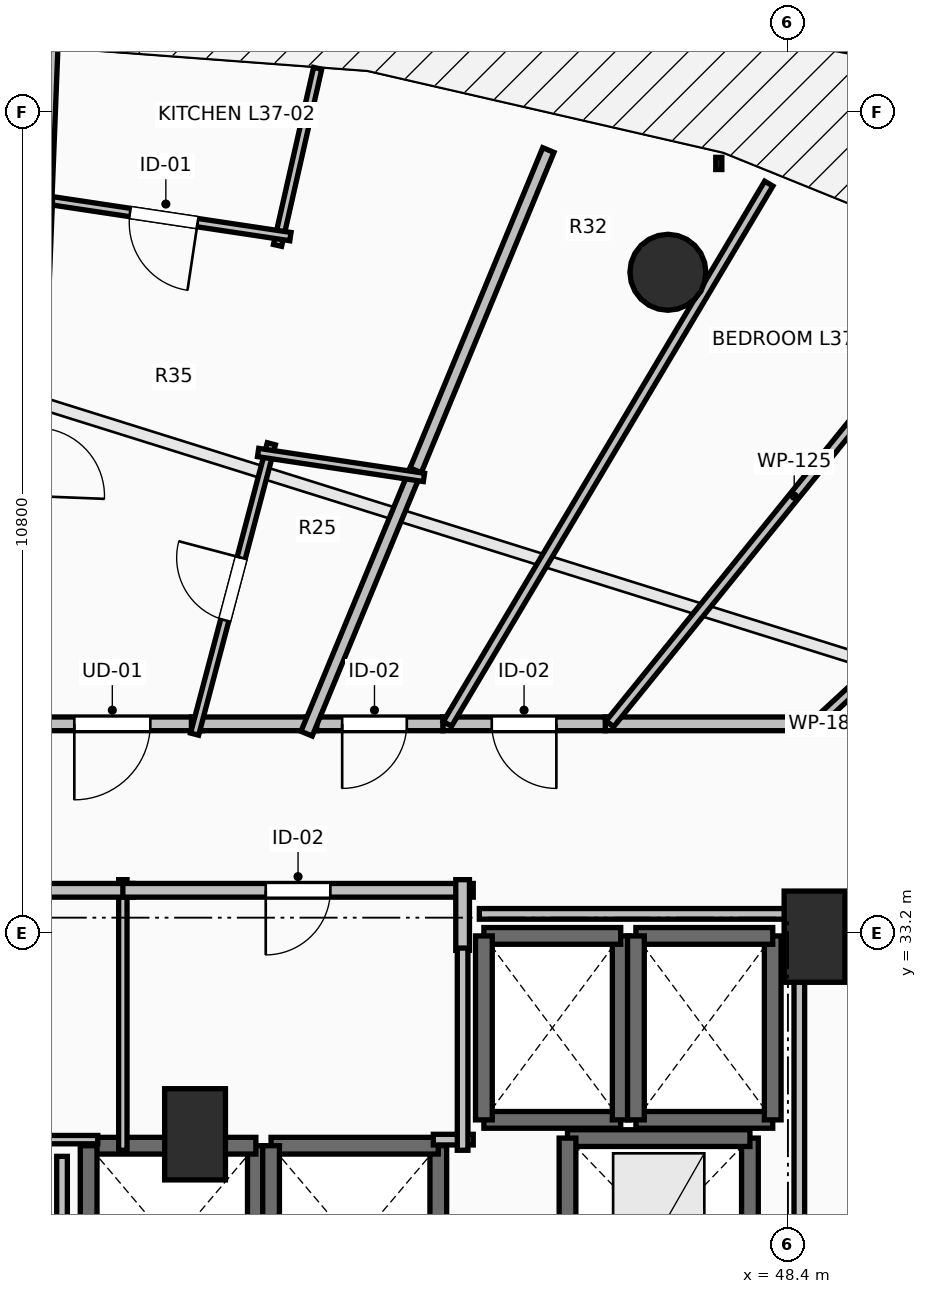
"""IFC4 building model, lengths in metres.
Left out: names, types, materials, properties, quantities, classifications, styles, units other than length and angle.
Written with IfcOpenShell. Run it as: python <this file> out.ifc"""

import sys

from ifc_helpers import new_model, si_unit, direction, frame, frame_2d, origin, origin_2d, place, context, subcontext, project, spatial, rectangle, circle, extrude, element, fill, save


model = new_model("IFC4")
c1 = context("Model", 3, precision=1e-05, world=origin(), true_north=direction((0.0, 1.0)))
c2 = subcontext(c1, "Body", "Model", "MODEL_VIEW")
j1 = project(units=[si_unit("LENGTHUNIT", "METRE"), si_unit("PLANEANGLEUNIT", "RADIAN")], contexts=[c1])
p1 = place(None, origin())
s1 = spatial("IfcSite", under=j1, at=p1, CompositionType="ELEMENT")
p2 = place(p1, origin())
s2 = spatial("IfcBuilding", under=s1, at=p2, CompositionType="ELEMENT")
p3 = place(p2, frame((0.0, 0.0, 139.6)))
s3 = spatial("IfcBuildingStorey", under=s2, at=p3, CompositionType="ELEMENT", Elevation=139.6)
p4 = place(p3, frame((46.821, 41.891, 0.0), z_axis=(0.0, 0.0, 1.0), x_axis=(0.382683432365, 0.923879532511, 0.0)))
e1 = element("IfcColumn", 1, at=p4, inside=s3, PredefinedType="COLUMN", context=c2, shape_type="SweptSolid", body=[
    extrude(circle(Radius=0.5, at=origin_2d()), origin(), (0.0, 0.0, 1.0), 3.5),
])
for number, where, z_axis, x_axis in (
    (2, (48.75, 33.15, 0.0), (0.0, 0.0, 1.0), (1.0, 0.0, 0.0)),
    (3, (40.6, 30.55, 0.0), (0.0, 0.0, 1.0), (1.0, 0.0, 0.0)),
):
    element("IfcColumn", number, at=place(p3, frame(where, z_axis=z_axis, x_axis=x_axis)), inside=s3, PredefinedType="PILASTER", context=c2, shape_type="SweptSolid", body=[
        extrude(rectangle(XDim=0.8, YDim=1.2, at=origin_2d()), origin(), (0.0, 0.0, 1.0), 3.5),
    ])
p5 = place(p3, frame((41.4, 27.8, 0.0), z_axis=(0.0, 0.0, 1.0), x_axis=(0.0, 1.0, 0.0)))
e4 = element("IfcWall", 4, at=p5, inside=s3, PredefinedType="SOLIDWALL", context=c2, shape_type="SweptSolid", body=[
    extrude(rectangle(XDim=2.6, YDim=0.22, at=frame_2d((1.3, 0.0))), origin(), (0.0, 0.0, 1.0), 3.24),
])
p6 = place(p3, frame((41.4, 30.4, 0.0), z_axis=(0.0, 0.0, 1.0), x_axis=(-1.0, 0.0, 0.0)))
e5 = element("IfcWall", 5, at=p6, inside=s3, PredefinedType="SOLIDWALL", context=c2, shape_type="SweptSolid", body=[
    extrude(rectangle(XDim=2.2, YDim=0.22, at=frame_2d((1.1, 0.0))), origin(), (0.0, 0.0, 1.0), 3.24),
])
for number, where, z_axis, x_axis in (
    (6, (39.2, 30.4, 0.0), (0.0, 0.0, 1.0), (0.0, -1.0, 0.0)),
    (7, (43.8, 27.8, 0.0), (0.0, 0.0, 1.0), (0.0, 1.0, 0.0)),
):
    element("IfcWall", number, at=place(p3, frame(where, z_axis=z_axis, x_axis=x_axis)), inside=s3, PredefinedType="SOLIDWALL", context=c2, shape_type="SweptSolid", body=[
        extrude(rectangle(XDim=2.6, YDim=0.22, at=frame_2d((1.3, 0.0))), origin(), (0.0, 0.0, 1.0), 3.24),
    ])
p7 = place(p3, frame((43.8, 30.4, 0.0), z_axis=(0.0, 0.0, 1.0), x_axis=(-1.0, 0.0, 0.0)))
e8 = element("IfcWall", 8, at=p7, inside=s3, PredefinedType="SOLIDWALL", context=c2, shape_type="SweptSolid", body=[
    extrude(rectangle(XDim=2.2, YDim=0.22, at=frame_2d((1.1, 0.0))), origin(), (0.0, 0.0, 1.0), 3.24),
])
p8 = place(p3, frame((41.6, 30.4, 0.0), z_axis=(0.0, 0.0, 1.0), x_axis=(0.0, -1.0, 0.0)))
e9 = element("IfcWall", 9, at=p8, inside=s3, PredefinedType="SOLIDWALL", context=c2, shape_type="SweptSolid", body=[
    extrude(rectangle(XDim=2.6, YDim=0.22, at=frame_2d((1.3, 0.0))), origin(), (0.0, 0.0, 1.0), 3.24),
])
p9 = place(p3, frame((44.4, 30.74, 0.0), z_axis=(0.0, 0.0, 1.0), x_axis=(1.0, 0.0, 0.0)))
e10 = element("IfcWall", 10, at=p9, inside=s3, PredefinedType="SOLIDWALL", context=c2, shape_type="SweptSolid", body=[
    extrude(rectangle(XDim=1.8, YDim=0.22, at=frame_2d((0.9, 0.0))), origin(), (0.0, 0.0, 1.0), 3.24),
])
p10 = place(p3, frame((46.2, 30.74, 0.0), z_axis=(0.0, 0.0, 1.0), x_axis=(0.0, 1.0, 0.0)))
e11 = element("IfcWall", 11, at=p10, inside=s3, PredefinedType="SOLIDWALL", context=c2, shape_type="SweptSolid", body=[
    extrude(rectangle(XDim=2.42, YDim=0.22, at=frame_2d((1.21, 0.0))), origin(), (0.0, 0.0, 1.0), 3.24),
])
p11 = place(p3, frame((46.2, 33.16, 0.0), z_axis=(0.0, 0.0, 1.0), x_axis=(-1.0, 0.0, 0.0)))
e12 = element("IfcWall", 12, at=p11, inside=s3, PredefinedType="SOLIDWALL", context=c2, shape_type="SweptSolid", body=[
    extrude(rectangle(XDim=1.8, YDim=0.22, at=frame_2d((0.9, 0.0))), origin(), (0.0, 0.0, 1.0), 3.24),
])
p12 = place(p3, frame((44.4, 33.16, 0.0), z_axis=(0.0, 0.0, 1.0), x_axis=(0.0, -1.0, 0.0)))
e13 = element("IfcWall", 13, at=p12, inside=s3, PredefinedType="SOLIDWALL", context=c2, shape_type="SweptSolid", body=[
    extrude(rectangle(XDim=2.42, YDim=0.22, at=frame_2d((1.21, 0.0))), origin(), (0.0, 0.0, 1.0), 3.24),
])
p13 = place(p3, frame((46.4, 30.74, 0.0), z_axis=(0.0, 0.0, 1.0), x_axis=(1.0, 0.0, 0.0)))
e14 = element("IfcWall", 14, at=p13, inside=s3, PredefinedType="SOLIDWALL", context=c2, shape_type="SweptSolid", body=[
    extrude(rectangle(XDim=1.8, YDim=0.22, at=frame_2d((0.9, 0.0))), origin(), (0.0, 0.0, 1.0), 3.24),
])
p14 = place(p3, frame((48.2, 30.74, 0.0), z_axis=(0.0, 0.0, 1.0), x_axis=(0.0, 1.0, 0.0)))
e15 = element("IfcWall", 15, at=p14, inside=s3, PredefinedType="SOLIDWALL", context=c2, shape_type="SweptSolid", body=[
    extrude(rectangle(XDim=2.42, YDim=0.22, at=frame_2d((1.21, 0.0))), origin(), (0.0, 0.0, 1.0), 3.24),
])
p15 = place(p3, frame((48.2, 33.16, 0.0), z_axis=(0.0, 0.0, 1.0), x_axis=(-1.0, 0.0, 0.0)))
e16 = element("IfcWall", 16, at=p15, inside=s3, PredefinedType="SOLIDWALL", context=c2, shape_type="SweptSolid", body=[
    extrude(rectangle(XDim=1.8, YDim=0.22, at=frame_2d((0.9, 0.0))), origin(), (0.0, 0.0, 1.0), 3.24),
])
p16 = place(p3, frame((46.4, 33.16, 0.0), z_axis=(0.0, 0.0, 1.0), x_axis=(0.0, -1.0, 0.0)))
e17 = element("IfcWall", 17, at=p16, inside=s3, PredefinedType="SOLIDWALL", context=c2, shape_type="SweptSolid", body=[
    extrude(rectangle(XDim=2.42, YDim=0.22, at=frame_2d((1.21, 0.0))), origin(), (0.0, 0.0, 1.0), 3.24),
])
p17 = place(p3, frame((47.9, 28.0, 0.0), z_axis=(0.0, 0.0, 1.0), x_axis=(0.0, 1.0, 0.0)))
e18 = element("IfcWall", 18, at=p17, inside=s3, PredefinedType="SHEAR", context=c2, shape_type="SweptSolid", body=[
    extrude(rectangle(XDim=2.5, YDim=0.22, at=frame_2d((1.25, 0.0))), origin(), (0.0, 0.0, 1.0), 3.24),
])
p18 = place(p3, frame((47.9, 30.5, 0.0), z_axis=(0.0, 0.0, 1.0), x_axis=(-1.0, 0.0, 0.0)))
e19 = element("IfcWall", 19, at=p18, inside=s3, PredefinedType="SHEAR", context=c2, shape_type="SweptSolid", body=[
    extrude(rectangle(XDim=2.4, YDim=0.22, at=frame_2d((1.2, 0.0))), origin(), (0.0, 0.0, 1.0), 3.24),
])
p19 = place(p3, frame((45.5, 30.5, 0.0), z_axis=(0.0, 0.0, 1.0), x_axis=(0.0, -1.0, 0.0)))
e20 = element("IfcWall", 20, at=p19, inside=s3, PredefinedType="SHEAR", context=c2, shape_type="SweptSolid", body=[
    extrude(rectangle(XDim=2.5, YDim=0.22, at=frame_2d((1.25, 0.0))), origin(), (0.0, 0.0, 1.0), 3.24),
])
p20 = place(p3, frame((39.65, 30.34, 0.0), z_axis=(0.0, 0.0, 1.0), x_axis=(0.0, 1.0, 0.0)))
e21 = element("IfcWall", 21, at=p20, inside=s3, PredefinedType="PARTITIONING", context=c2, shape_type="SweptSolid", body=[
    extrude(rectangle(XDim=3.56, YDim=0.11, at=frame_2d((1.78, 0.0))), origin(), (0.0, 0.0, 1.0), 2.432),
])
p21 = place(p3, frame((36.16, 30.48, 0.0), z_axis=(0.0, 0.0, 1.0), x_axis=(1.0, 0.0, 0.0)))
e22 = element("IfcWall", 22, at=p21, inside=s3, PredefinedType="PARTITIONING", context=c2, shape_type="SweptSolid", body=[
    extrude(rectangle(XDim=3.16, YDim=0.11, at=frame_2d((1.58, 0.0))), origin(), (0.0, 0.0, 1.0), 2.432),
])
p22 = place(p3, frame((39.79, 33.76, 0.0), z_axis=(0.0, 0.0, 1.0), x_axis=(-1.0, 0.0, 0.0)))
e23 = element("IfcWall", 23, at=p22, inside=s3, PredefinedType="PARTITIONING", context=c2, shape_type="SweptSolid", body=[
    extrude(rectangle(XDim=3.63, YDim=0.18, at=frame_2d((1.815, 0.0))), origin(), (0.0, 0.0, 1.0), 3.24),
])
p23 = place(p22, frame((1.39, 0.0, 0.0)))
e24 = element("IfcOpeningElement", 24, at=p23, cuts=e23, PredefinedType="OPENING", context=c2, shape_type="SweptSolid", body=[
    extrude(rectangle(XDim=0.85, YDim=2.1, at=frame_2d((0.425, 1.05))), frame((0.0, 0.105, 0.0), z_axis=(0.0, -1.0, 0.0), x_axis=(1.0, 0.0, 0.0)), (0.0, 0.0, 1.0), 0.21),
])
p24 = place(p3, frame((44.26, 33.76, 0.0), z_axis=(0.0, 0.0, 1.0), x_axis=(-1.0, 0.0, 0.0)))
e25 = element("IfcWall", 25, at=p24, inside=s3, PredefinedType="PARTITIONING", context=c2, shape_type="SweptSolid", body=[
    extrude(rectangle(XDim=4.61, YDim=0.18, at=frame_2d((2.305, 0.0))), origin(), (0.0, 0.0, 1.0), 3.24),
])
p25 = place(p24, frame((1.88, 0.0, 0.0)))
e26 = element("IfcOpeningElement", 26, at=p25, cuts=e25, PredefinedType="OPENING", context=c2, shape_type="SweptSolid", body=[
    extrude(rectangle(XDim=0.85, YDim=2.1, at=frame_2d((0.425, 1.05))), frame((0.0, 0.105, 0.0), z_axis=(0.0, -1.0, 0.0), x_axis=(1.0, 0.0, 0.0)), (0.0, 0.0, 1.0), 0.21),
])
p26 = place(p3, frame((44.12, 32.97, 0.0), z_axis=(0.0, 0.0, 1.0), x_axis=(0.0, 1.0, 0.0)))
e27 = element("IfcWall", 27, at=p26, inside=s3, PredefinedType="PARTITIONING", context=c2, shape_type="SweptSolid", body=[
    extrude(rectangle(XDim=0.93, YDim=0.18, at=frame_2d((0.465, 0.0))), origin(), (0.0, 0.0, 1.0), 3.24),
])
p27 = place(p3, frame((50.8, 35.95, 0.0), z_axis=(0.0, 0.0, 1.0), x_axis=(-1.0, 0.0, 0.0)))
e28 = element("IfcWall", 28, at=p27, inside=s3, PredefinedType="PARTITIONING", context=c2, shape_type="SweptSolid", body=[
    extrude(rectangle(XDim=2.096, YDim=0.18, at=frame_2d((1.048, 0.0))), origin(), (0.0, 0.0, 1.0), 2.972),
])
p28 = place(p3, frame((48.704, 35.95, 0.0), z_axis=(0.0, 0.0, 1.0), x_axis=(-1.0, 0.0, 0.0)))
e29 = element("IfcWall", 29, at=p28, inside=s3, PredefinedType="PARTITIONING", context=c2, shape_type="SweptSolid", body=[
    extrude(rectangle(XDim=2.707, YDim=0.18, at=frame_2d((1.354, 0.0))), origin(), (0.0, 0.0, 1.0), 2.432),
])
p29 = place(p3, frame((45.997, 35.95, 0.0), z_axis=(0.0, 0.0, 1.0), x_axis=(-1.0, 0.0, 0.0)))
e30 = element("IfcWall", 30, at=p29, inside=s3, PredefinedType="PARTITIONING", context=c2, shape_type="SweptSolid", body=[
    extrude(rectangle(XDim=2.137, YDim=0.18, at=frame_2d((1.068, 0.0))), origin(), (0.0, 0.0, 1.0), 2.972),
])
p30 = place(p29, frame((0.644, 0.0, 0.0)))
e31 = element("IfcOpeningElement", 31, at=p30, cuts=e30, PredefinedType="OPENING", context=c2, shape_type="SweptSolid", body=[
    extrude(rectangle(XDim=0.85, YDim=2.1, at=frame_2d((0.425, 1.05))), frame((0.0, 0.105, 0.0), z_axis=(0.0, -1.0, 0.0), x_axis=(1.0, 0.0, 0.0)), (0.0, 0.0, 1.0), 0.21),
])
p31 = place(p3, frame((43.86, 35.95, 0.0), z_axis=(0.0, 0.0, 1.0), x_axis=(-1.0, 0.0, 0.0)))
e32 = element("IfcWall", 32, at=p31, inside=s3, PredefinedType="PARTITIONING", context=c2, shape_type="SweptSolid", body=[
    extrude(rectangle(XDim=1.799, YDim=0.18, at=frame_2d((0.899, 0.0))), origin(), (0.0, 0.0, 1.0), 3.24),
])
p32 = place(p31, frame((0.475, 0.0, 0.0)))
e33 = element("IfcOpeningElement", 33, at=p32, cuts=e32, PredefinedType="OPENING", context=c2, shape_type="SweptSolid", body=[
    extrude(rectangle(XDim=0.85, YDim=2.1, at=frame_2d((0.425, 1.05))), frame((0.0, 0.105, 0.0), z_axis=(0.0, -1.0, 0.0), x_axis=(1.0, 0.0, 0.0)), (0.0, 0.0, 1.0), 0.21),
])
p33 = place(p3, frame((40.692, 35.95, 0.0), z_axis=(0.0, 0.0, 1.0), x_axis=(-1.0, 0.0, 0.0)))
e34 = element("IfcWall", 34, at=p33, inside=s3, PredefinedType="PARTITIONING", context=c2, shape_type="SweptSolid", body=[
    extrude(rectangle(XDim=2.361, YDim=0.18, at=frame_2d((1.18, 0.0))), origin(), (0.0, 0.0, 1.0), 3.24),
])
p34 = place(p33, frame((0.68, 0.0, 0.0)))
e35 = element("IfcOpeningElement", 35, at=p34, cuts=e34, PredefinedType="OPENING", context=c2, shape_type="SweptSolid", body=[
    extrude(rectangle(XDim=1.0, YDim=2.15, at=frame_2d((0.5, 1.075))), frame((0.0, 0.105, 0.0), z_axis=(0.0, -1.0, 0.0), x_axis=(1.0, 0.0, 0.0)), (0.0, 0.0, 1.0), 0.21),
])
p35 = place(p3, frame((42.201, 35.95, 0.0), z_axis=(0.0, 0.0, 1.0), x_axis=(-1.0, 0.0, 0.0)))
e36 = element("IfcWall", 36, at=p35, inside=s3, PredefinedType="PARTITIONING", context=c2, shape_type="SweptSolid", body=[
    extrude(rectangle(XDim=1.649, YDim=0.18, at=frame_2d((0.824, 0.0))), origin(), (0.0, 0.0, 1.0), 3.24),
])
p36 = place(p3, frame((51.874, 38.824, 0.0), z_axis=(0.0, 0.0, 1.0), x_axis=(-0.734347971597, -0.678773199685, 0.0)))
e37 = element("IfcWall", 37, at=p36, inside=s3, PredefinedType="PARTITIONING", context=c2, shape_type="SweptSolid", body=[
    extrude(rectangle(XDim=4.235, YDim=0.125, at=frame_2d((2.117, 0.0))), origin(), (0.0, 0.0, 1.0), 2.922),
])
p37 = place(p36, frame((1.667, 0.0, 0.0)))
e38 = element("IfcOpeningElement", 38, at=p37, cuts=e37, PredefinedType="OPENING", context=c2, shape_type="SweptSolid", body=[
    extrude(rectangle(XDim=0.9, YDim=2.1, at=frame_2d((0.45, 1.05))), frame((0.0, 0.077, 0.0), z_axis=(0.0, -1.0, 0.0), x_axis=(1.0, 0.0, 0.0)), (0.0, 0.0, 1.0), 0.155),
])
p38 = place(p3, frame((50.908, 41.94, 0.0), z_axis=(0.0, 0.0, 1.0), x_axis=(-0.62935766896, -0.77711577292, 0.0)))
e39 = element("IfcWall", 39, at=p38, inside=s3, PredefinedType="PARTITIONING", context=c2, shape_type="SweptSolid", body=[
    extrude(rectangle(XDim=7.708, YDim=0.125, at=frame_2d((3.854, 0.0))), origin(), (0.0, 0.0, 1.0), 2.432),
])
p39 = place(p3, frame((48.148, 43.057, 0.0), z_axis=(0.0, 0.0, 1.0), x_axis=(-0.511279346901, -0.859414585304, 0.0)))
e40 = element("IfcWall", 40, at=p39, inside=s3, PredefinedType="PARTITIONING", context=c2, shape_type="SweptSolid", body=[
    extrude(rectangle(XDim=8.27, YDim=0.125, at=frame_2d((4.135, 0.0))), origin(), (0.0, 0.0, 1.0), 2.432),
])
p40 = place(p3, frame((45.248, 43.499, 0.0), z_axis=(0.0, 0.0, 1.0), x_axis=(-0.382708032219, -0.923869342535, 0.0)))
e41 = element("IfcWall", 41, at=p40, inside=s3, PredefinedType="PARTITIONING", context=c2, shape_type="SweptSolid", body=[
    extrude(rectangle(XDim=4.701, YDim=0.16, at=frame_2d((2.351, 0.0))), origin(), (0.0, 0.0, 1.0), 2.728),
])
p41 = place(p3, frame((43.503, 39.285, 0.0), z_axis=(0.0, 0.0, 1.0), x_axis=(-0.382733183699, -0.923858923265, 0.0)))
e42 = element("IfcWall", 42, at=p41, inside=s3, PredefinedType="PARTITIONING", context=c2, shape_type="SweptSolid", body=[
    extrude(rectangle(XDim=3.75, YDim=0.16, at=frame_2d((1.875, 0.0))), origin(), (0.0, 0.0, 1.0), 2.922),
])
p42 = place(p3, frame((40.594, 35.815, 0.0), z_axis=(0.0, 0.0, 1.0), x_axis=(0.255512094359, 0.966805859331, 0.0)))
e43 = element("IfcWall", 43, at=p42, inside=s3, PredefinedType="PARTITIONING", context=c2, shape_type="SweptSolid", body=[
    extrude(rectangle(XDim=3.951, YDim=0.11, at=frame_2d((1.976, 0.0))), origin(), (0.0, 0.0, 1.0), 2.922),
])
p43 = place(p42, frame((1.551, 0.0, 0.0)))
e44 = element("IfcOpeningElement", 44, at=p43, cuts=e43, PredefinedType="OPENING", context=c2, shape_type="SweptSolid", body=[
    extrude(rectangle(XDim=0.85, YDim=2.1, at=frame_2d((0.425, 1.05))), frame((0.0, 0.07, 0.0), z_axis=(0.0, -1.0, 0.0), x_axis=(1.0, 0.0, 0.0)), (0.0, 0.0, 1.0), 0.14),
])
p44 = place(p3, frame((41.43, 39.52, 0.0), z_axis=(0.0, 0.0, 1.0), x_axis=(0.98891036234, -0.148513619769, 0.0)))
e45 = element("IfcWall", 45, at=p44, inside=s3, PredefinedType="PARTITIONING", context=c2, shape_type="SweptSolid", body=[
    extrude(rectangle(XDim=2.206, YDim=0.11, at=frame_2d((1.103, 0.0))), origin(), (0.0, 0.0, 1.0), 2.922),
])
p45 = place(p3, frame((42.213, 44.574, 0.0), z_axis=(0.0, 0.0, 1.0), x_axis=(-0.220932027223, -0.975289208054, 0.0)))
e46 = element("IfcWall", 46, at=p45, inside=s3, PredefinedType="PARTITIONING", context=c2, shape_type="SweptSolid", body=[
    extrude(rectangle(XDim=2.389, YDim=0.11, at=frame_2d((1.195, 0.0))), origin(), (0.0, 0.0, 1.0), 2.728),
])
p46 = place(p3, frame((41.854, 42.36, 0.0), z_axis=(0.0, 0.0, 1.0), x_axis=(-0.988887919082, 0.148662986296, 0.0)))
e47 = element("IfcWall", 47, at=p46, inside=s3, PredefinedType="PARTITIONING", context=c2, shape_type="SweptSolid", body=[
    extrude(rectangle(XDim=3.368, YDim=0.11, at=frame_2d((1.684, 0.0))), origin(), (0.0, 0.0, 1.0), 3.24),
])
p47 = place(p46, frame((1.234, 0.0, 0.0)))
e48 = element("IfcOpeningElement", 48, at=p47, cuts=e47, PredefinedType="OPENING", context=c2, shape_type="SweptSolid", body=[
    extrude(rectangle(XDim=0.9, YDim=2.1, at=frame_2d((0.45, 1.05))), frame((0.0, 0.07, 0.0), z_axis=(0.0, -1.0, 0.0), x_axis=(1.0, 0.0, 0.0)), (0.0, 0.0, 1.0), 0.14),
])
p48 = place(p3, frame((38.662, 42.84, 0.0), z_axis=(0.0, 0.0, 1.0), x_axis=(-0.039300632457, -0.999227431713, 0.0)))
e49 = element("IfcWall", 49, at=p48, inside=s3, PredefinedType="PARTITIONING", context=c2, shape_type="SweptSolid", body=[
    extrude(rectangle(XDim=6.896, YDim=0.125, at=frame_2d((3.448, 0.0))), origin(), (0.0, 0.0, 1.0), 2.922),
])
p49 = place(p48, frame((2.998, 0.0, 0.0)))
e50 = element("IfcOpeningElement", 50, at=p49, cuts=e49, PredefinedType="OPENING", context=c2, shape_type="SweptSolid", body=[
    extrude(rectangle(XDim=0.9, YDim=2.1, at=frame_2d((0.45, 1.05))), frame((0.0, 0.077, 0.0), z_axis=(0.0, -1.0, 0.0), x_axis=(1.0, 0.0, 0.0)), (0.0, 0.0, 1.0), 0.155),
])
p50 = place(p3, frame((38.74, 44.835, 0.0), z_axis=(0.0, 0.0, 1.0), x_axis=(-0.039310852952, -0.999227029679, 0.0)))
e51 = element("IfcWall", 51, at=p50, inside=s3, PredefinedType="PARTITIONING", context=c2, shape_type="SweptSolid", body=[
    extrude(rectangle(XDim=2.136, YDim=0.11, at=frame_2d((1.068, 0.0))), origin(), (0.0, 0.0, 1.0), 2.728),
])
p51 = place(p3, frame((43.735, 30.48, 0.0), z_axis=(0.0, 0.0, 1.0), x_axis=(1.0, 0.0, 0.0)))
e52 = element("IfcWall", 52, at=p51, inside=s3, PredefinedType="PARTITIONING", context=c2, shape_type="SweptSolid", body=[
    extrude(rectangle(XDim=0.525, YDim=0.14, at=frame_2d((0.262, 0.0))), origin(), (0.0, 0.0, 1.0), 3.24),
])
p52 = place(p3, frame((44.12, 30.34, 0.0), z_axis=(0.0, 0.0, 1.0), x_axis=(0.0, 1.0, 0.0)))
e53 = element("IfcWall", 53, at=p52, inside=s3, PredefinedType="PARTITIONING", context=c2, shape_type="SweptSolid", body=[
    extrude(rectangle(XDim=2.66, YDim=0.14, at=frame_2d((1.33, 0.0))), origin(), (0.0, 0.0, 1.0), 3.24),
])
p53 = place(p3, frame((38.85, 27.87, 0.0), z_axis=(0.0, 0.0, 1.0), x_axis=(0.0, 1.0, 0.0)))
e54 = element("IfcWall", 54, at=p53, inside=s3, PredefinedType="PARTITIONING", context=c2, shape_type="SweptSolid", body=[
    extrude(rectangle(XDim=2.39, YDim=0.14, at=frame_2d((1.195, 0.0))), origin(), (0.0, 0.0, 1.0), 3.24),
])
p54 = place(p3, frame((48.55, 28.196, 0.0), z_axis=(0.0, 0.0, 1.0), x_axis=(0.0, 1.0, 0.0)))
e55 = element("IfcWall", 55, at=p54, inside=s3, PredefinedType="PARTITIONING", context=c2, shape_type="SweptSolid", body=[
    extrude(rectangle(XDim=5.254, YDim=0.14, at=frame_2d((2.627, 0.0))), origin(), (0.0, 0.0, 1.0), 2.432),
])
p55 = place(p3, frame((48.55, 33.45, 0.0), z_axis=(0.0, 0.0, 1.0), x_axis=(-1.0, 0.0, 0.0)))
e56 = element("IfcWall", 56, at=p55, inside=s3, PredefinedType="PARTITIONING", context=c2, shape_type="SweptSolid", body=[
    extrude(rectangle(XDim=4.21, YDim=0.14, at=frame_2d((2.105, 0.0))), origin(), (0.0, 0.0, 1.0), 2.432),
])
p56 = place(p25, origin())
e57 = element("IfcDoor", 57, at=p56, inside=s3, OperationType="SINGLE_SWING_RIGHT", PredefinedType="DOOR", context=c2, shape_type="SweptSolid", body=[
    extrude(rectangle(XDim=0.85, YDim=2.1, at=frame_2d((0.425, 1.05))), frame((0.0, 0.025, 0.0), z_axis=(0.0, -1.0, 0.0), x_axis=(1.0, 0.0, 0.0)), (0.0, 0.0, 1.0), 0.05),
])
fill(e26, e57)
p57 = place(p34, origin())
e58 = element("IfcDoor", 58, at=p57, inside=s3, OperationType="SINGLE_SWING_RIGHT", PredefinedType="DOOR", context=c2, shape_type="SweptSolid", body=[
    extrude(rectangle(XDim=1.0, YDim=2.15, at=frame_2d((0.5, 1.075))), frame((0.0, 0.025, 0.0), z_axis=(0.0, -1.0, 0.0), x_axis=(1.0, 0.0, 0.0)), (0.0, 0.0, 1.0), 0.05),
])
fill(e35, e58)
p58 = place(p43, origin())
e59 = element("IfcDoor", 59, at=p58, inside=s3, OperationType="SINGLE_SWING_RIGHT", PredefinedType="DOOR", context=c2, shape_type="SweptSolid", body=[
    extrude(rectangle(XDim=0.85, YDim=2.1, at=frame_2d((0.425, 1.05))), frame((0.0, 0.025, 0.0), z_axis=(0.0, -1.0, 0.0), x_axis=(1.0, 0.0, 0.0)), (0.0, 0.0, 1.0), 0.05),
])
fill(e44, e59)
p59 = place(p47, origin())
e60 = element("IfcDoor", 60, at=p59, inside=s3, OperationType="SINGLE_SWING_LEFT", PredefinedType="DOOR", context=c2, shape_type="SweptSolid", body=[
    extrude(rectangle(XDim=0.9, YDim=2.1, at=frame_2d((0.45, 1.05))), frame((0.0, 0.025, 0.0), z_axis=(0.0, -1.0, 0.0), x_axis=(1.0, 0.0, 0.0)), (0.0, 0.0, 1.0), 0.05),
])
fill(e48, e60)
p60 = place(p30, origin())
e61 = element("IfcDoor", 61, at=p60, inside=s3, OperationType="SINGLE_SWING_LEFT", PredefinedType="DOOR", context=c2, shape_type="SweptSolid", body=[
    extrude(rectangle(XDim=0.85, YDim=2.1, at=frame_2d((0.425, 1.05))), frame((0.0, 0.025, 0.0), z_axis=(0.0, -1.0, 0.0), x_axis=(1.0, 0.0, 0.0)), (0.0, 0.0, 1.0), 0.05),
])
fill(e31, e61)
p61 = place(p32, origin())
e62 = element("IfcDoor", 62, at=p61, inside=s3, OperationType="SINGLE_SWING_RIGHT", PredefinedType="DOOR", context=c2, shape_type="SweptSolid", body=[
    extrude(rectangle(XDim=0.85, YDim=2.1, at=frame_2d((0.425, 1.05))), frame((0.0, 0.025, 0.0), z_axis=(0.0, -1.0, 0.0), x_axis=(1.0, 0.0, 0.0)), (0.0, 0.0, 1.0), 0.05),
])
fill(e33, e62)
save(model, sys.argv[1])
